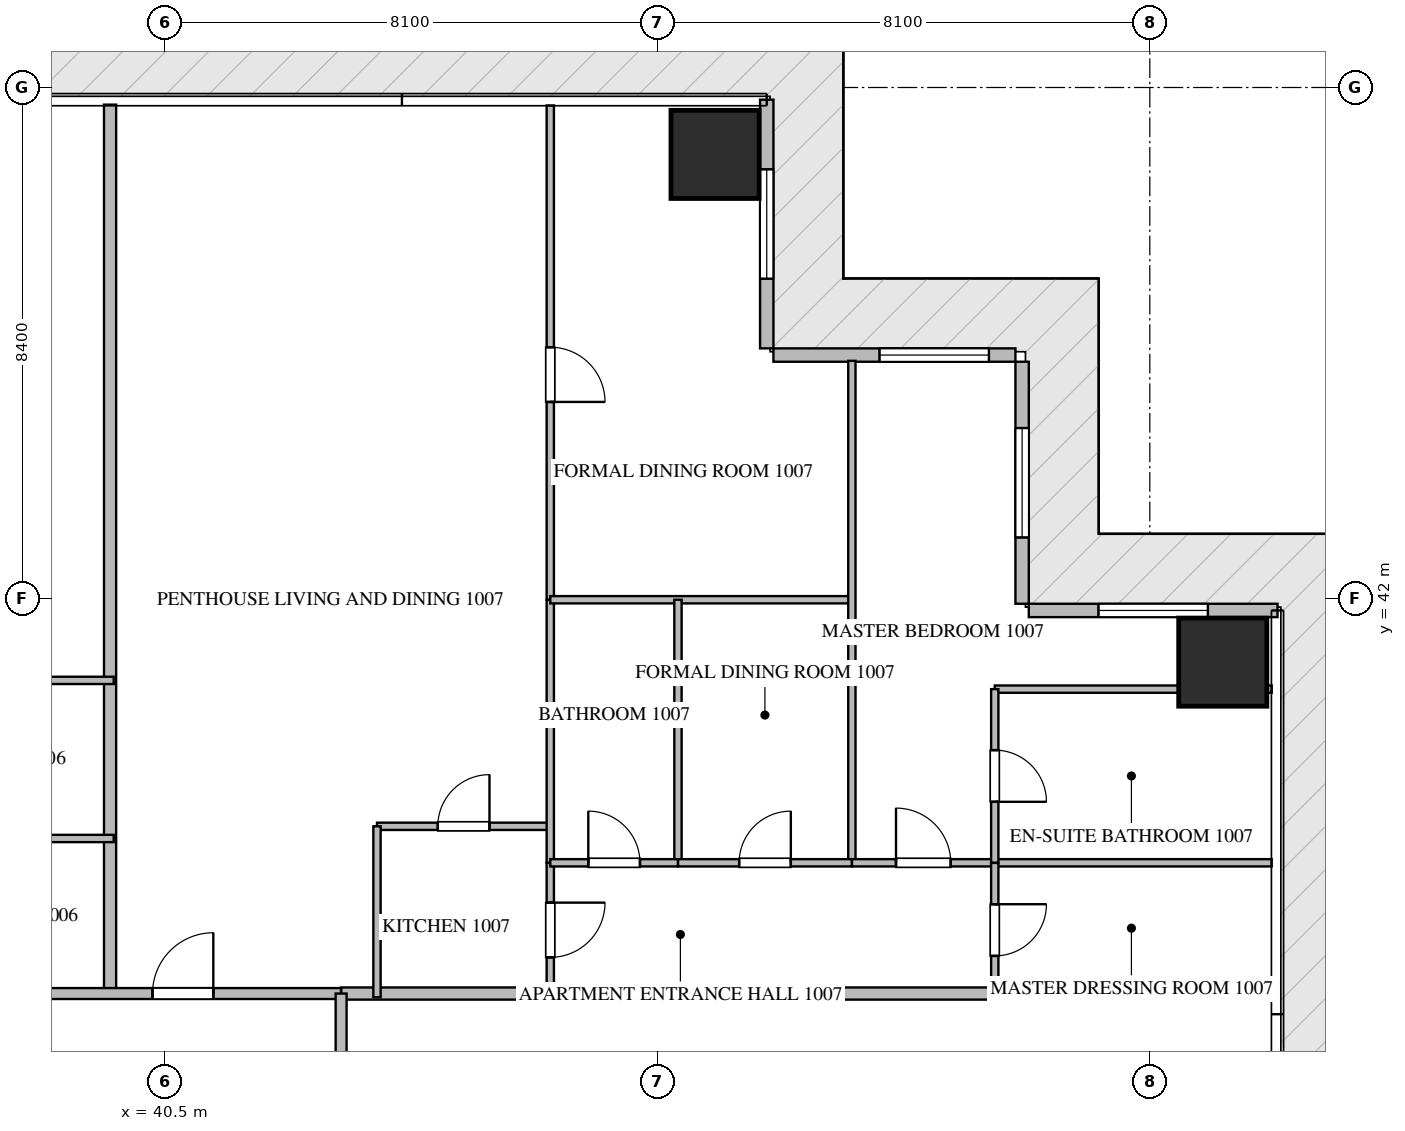
"""IFC4 building model, lengths in metres.
Left out: names, types, materials, properties, quantities, classifications, styles, units other than length and angle.
Written with IfcOpenShell. Run it as: python <this file> out.ifc"""

import sys

from ifc_helpers import new_model, si_unit, direction, frame, frame_2d, origin, origin_2d, place, context, subcontext, project, spatial, rectangle, extrude, source, transform, mapped, element, fill, save


model = new_model("IFC4")
c1 = context("Model", 3, precision=1e-05, world=origin(), true_north=direction((0.0, 1.0)))
c2 = subcontext(c1, "Body", "Model", "MODEL_VIEW")
j1 = project(units=[si_unit("LENGTHUNIT", "METRE"), si_unit("PLANEANGLEUNIT", "RADIAN")], contexts=[c1])
p1 = place(None, origin())
s1 = spatial("IfcSite", under=j1, at=p1, CompositionType="ELEMENT")
p2 = place(p1, origin())
s2 = spatial("IfcBuilding", under=s1, at=p2, CompositionType="ELEMENT")
p3 = place(p2, frame((0.0, 0.0, 45.45)))
s3 = spatial("IfcBuildingStorey", under=s2, at=p3, CompositionType="ELEMENT", Elevation=45.45)
m1 = source(origin(), c2, "Body", "SweptSolid", [
    extrude(rectangle(XDim=1.45, YDim=1.45, at=origin_2d()), origin(), (0.0, 0.0, 1.0), 3.75),
])
for number, where, z_axis, x_axis in (
    (1, (49.55, 49.3, -0.26), (0.0, 0.0, 1.0), (1.0, 0.0, 0.0)),
    (2, (57.9, 40.95, -0.26), (0.0, 0.0, 1.0), (1.0, 0.0, 0.0)),
):
    element("IfcColumn", number, at=place(p3, frame(where, z_axis=z_axis, x_axis=x_axis)), inside=s3, PredefinedType="COLUMN", context=c2, shape_type="MappedRepresentation", body=[
        mapped(m1, transform((0.0, 0.0, 0.0), scale=1.0)),
    ])
p4 = place(p3, frame((58.8, 41.8, 0.0), z_axis=(0.0, 0.0, 1.0), x_axis=(-1.0, 0.0, 0.0)))
e3 = element("IfcWall", 3, at=p4, inside=s3, PredefinedType="ELEMENTEDWALL", context=c2, shape_type="SweptSolid", body=[
    extrude(rectangle(XDim=4.09, YDim=0.22, at=frame_2d((2.045, 0.0))), origin(), (0.0, 0.0, 1.0), 3.475),
])
p5 = place(p4, frame((1.145, 0.0, 0.65)))
e4 = element("IfcOpeningElement", 4, at=p5, cuts=e3, PredefinedType="OPENING", context=c2, shape_type="SweptSolid", body=[
    extrude(rectangle(XDim=1.8, YDim=2.1, at=frame_2d((0.9, 1.05))), frame((0.0, 0.12, 0.0), z_axis=(0.0, -1.0, 0.0), x_axis=(1.0, 0.0, 0.0)), (0.0, 0.0, 1.0), 0.24),
])
p6 = place(p3, frame((54.6, 41.91, 0.0), z_axis=(0.0, 0.0, 1.0), x_axis=(0.0, 1.0, 0.0)))
e5 = element("IfcWall", 5, at=p6, inside=s3, PredefinedType="ELEMENTEDWALL", context=c2, shape_type="SweptSolid", body=[
    extrude(rectangle(XDim=3.98, YDim=0.22, at=frame_2d((1.99, 0.0))), origin(), (0.0, 0.0, 1.0), 3.475),
])
p7 = place(p6, frame((1.09, 0.0, 0.65)))
e6 = element("IfcOpeningElement", 6, at=p7, cuts=e5, PredefinedType="OPENING", context=c2, shape_type="SweptSolid", body=[
    extrude(rectangle(XDim=1.8, YDim=2.1, at=frame_2d((0.9, 1.05))), frame((0.0, 0.12, 0.0), z_axis=(0.0, -1.0, 0.0), x_axis=(1.0, 0.0, 0.0)), (0.0, 0.0, 1.0), 0.24),
])
p8 = place(p3, frame((54.49, 46.0, 0.0), z_axis=(0.0, 0.0, 1.0), x_axis=(-1.0, 0.0, 0.0)))
e7 = element("IfcWall", 7, at=p8, inside=s3, PredefinedType="ELEMENTEDWALL", context=c2, shape_type="SweptSolid", body=[
    extrude(rectangle(XDim=3.98, YDim=0.22, at=frame_2d((1.99, 0.0))), origin(), (0.0, 0.0, 1.0), 3.475),
])
p9 = place(p8, frame((0.436, 0.0, 0.65)))
e8 = element("IfcOpeningElement", 8, at=p9, cuts=e7, PredefinedType="OPENING", context=c2, shape_type="SweptSolid", body=[
    extrude(rectangle(XDim=1.8, YDim=2.1, at=frame_2d((0.9, 1.05))), frame((0.0, 0.12, 0.0), z_axis=(0.0, -1.0, 0.0), x_axis=(1.0, 0.0, 0.0)), (0.0, 0.0, 1.0), 0.24),
])
p10 = place(p3, frame((50.4, 46.11, 0.0), z_axis=(0.0, 0.0, 1.0), x_axis=(0.0, 1.0, 0.0)))
e9 = element("IfcWall", 9, at=p10, inside=s3, PredefinedType="ELEMENTEDWALL", context=c2, shape_type="SweptSolid", body=[
    extrude(rectangle(XDim=4.09, YDim=0.22, at=frame_2d((2.045, 0.0))), origin(), (0.0, 0.0, 1.0), 3.475),
])
p11 = place(p10, frame((1.145, 0.0, 0.65)))
e10 = element("IfcOpeningElement", 10, at=p11, cuts=e9, PredefinedType="OPENING", context=c2, shape_type="SweptSolid", body=[
    extrude(rectangle(XDim=1.8, YDim=2.1, at=frame_2d((0.9, 1.05))), frame((0.0, 0.12, 0.0), z_axis=(0.0, -1.0, 0.0), x_axis=(1.0, 0.0, 0.0)), (0.0, 0.0, 1.0), 0.24),
])
p12 = place(p3, frame((39.6, 35.5, 0.0), z_axis=(0.0, 0.0, 1.0), x_axis=(0.0, 1.0, 0.0)))
e11 = element("IfcWall", 11, at=p12, inside=s3, PredefinedType="PARTITIONING", context=c2, shape_type="SweptSolid", body=[
    extrude(rectangle(XDim=14.618, YDim=0.2, at=frame_2d((7.309, 0.0))), origin(), (0.0, 0.0, 1.0), 3.49),
])
p13 = place(p3, frame((43.4, 35.5, 0.0), z_axis=(0.0, 0.0, 1.0), x_axis=(1.0, 0.0, 0.0)))
e12 = element("IfcWall", 12, at=p13, inside=s3, PredefinedType="PARTITIONING", context=c2, shape_type="SweptSolid", body=[
    extrude(rectangle(XDim=15.318, YDim=0.2, at=frame_2d((7.659, 0.0))), origin(), (0.0, 0.0, 1.0), 3.49),
])
p14 = place(p3, frame((21.402, 35.5, 0.0), z_axis=(0.0, 0.0, 1.0), x_axis=(1.0, 0.0, 0.0)))
e13 = element("IfcWall", 13, at=p14, inside=s3, PredefinedType="PARTITIONING", context=c2, shape_type="SweptSolid", body=[
    extrude(rectangle(XDim=21.996, YDim=0.18, at=frame_2d((10.998, 0.0))), origin(), (0.0, 0.0, 1.0), 3.49),
])
p15 = place(p14, frame((2.1, 0.0, 0.0)))
e14 = element("IfcOpeningElement", 14, at=p15, cuts=e13, PredefinedType="OPENING", context=c2, shape_type="SweptSolid", body=[
    extrude(rectangle(XDim=1.0, YDim=2.15, at=frame_2d((0.5, 1.075))), frame((0.0, 0.1, 0.0), z_axis=(0.0, -1.0, 0.0), x_axis=(1.0, 0.0, 0.0)), (0.0, 0.0, 1.0), 0.2),
])
p16 = place(p14, frame((5.333, 0.0, 0.0)))
e15 = element("IfcOpeningElement", 15, at=p16, cuts=e13, PredefinedType="OPENING", context=c2, shape_type="SweptSolid", body=[
    extrude(rectangle(XDim=1.0, YDim=2.15, at=frame_2d((0.5, 1.075))), frame((0.0, 0.1, 0.0), z_axis=(0.0, -1.0, 0.0), x_axis=(1.0, 0.0, 0.0)), (0.0, 0.0, 1.0), 0.2),
])
p17 = place(p14, frame((11.842, 0.0, 0.0)))
e16 = element("IfcOpeningElement", 16, at=p17, cuts=e13, PredefinedType="OPENING", context=c2, shape_type="SweptSolid", body=[
    extrude(rectangle(XDim=1.0, YDim=2.15, at=frame_2d((0.5, 1.075))), frame((0.0, 0.1, 0.0), z_axis=(0.0, -1.0, 0.0), x_axis=(1.0, 0.0, 0.0)), (0.0, 0.0, 1.0), 0.2),
])
p18 = place(p14, frame((18.896, 0.0, 0.0)))
e17 = element("IfcOpeningElement", 17, at=p18, cuts=e13, PredefinedType="OPENING", context=c2, shape_type="SweptSolid", body=[
    extrude(rectangle(XDim=1.0, YDim=2.15, at=frame_2d((0.5, 1.075))), frame((0.0, 0.1, 0.0), z_axis=(0.0, -1.0, 0.0), x_axis=(1.0, 0.0, 0.0)), (0.0, 0.0, 1.0), 0.2),
])
p19 = place(p3, frame((43.4, 14.9, 0.0), z_axis=(0.0, 0.0, 1.0), x_axis=(0.0, 1.0, 0.0)))
e18 = element("IfcWall", 18, at=p19, inside=s3, PredefinedType="PARTITIONING", context=c2, shape_type="SweptSolid", body=[
    extrude(rectangle(XDim=20.6, YDim=0.18, at=frame_2d((10.3, 0.0))), origin(), (0.0, 0.0, 1.0), 3.49),
])
p20 = place(p19, frame((17.64, 0.0, 0.0)))
e19 = element("IfcOpeningElement", 19, at=p20, cuts=e18, PredefinedType="OPENING", context=c2, shape_type="SweptSolid", body=[
    extrude(rectangle(XDim=1.0, YDim=2.15, at=frame_2d((0.5, 1.075))), frame((0.0, 0.1, 0.0), z_axis=(0.0, -1.0, 0.0), x_axis=(1.0, 0.0, 0.0)), (0.0, 0.0, 1.0), 0.2),
])
for number, where, z_axis, x_axis in (
    (20, (35.3, 38.05, 0.0), (0.0, 0.0, 1.0), (1.0, 0.0, 0.0)),
    (21, (35.3, 40.65, 0.0), (0.0, 0.0, 1.0), (1.0, 0.0, 0.0)),
):
    element("IfcWall", number, at=place(p3, frame(where, z_axis=z_axis, x_axis=x_axis)), inside=s3, PredefinedType="PARTITIONING", context=c2, shape_type="SweptSolid", body=[
        extrude(rectangle(XDim=4.36, YDim=0.12, at=frame_2d((2.18, 0.0))), origin(), (0.0, 0.0, 1.0), 3.49),
    ])
p21 = place(p3, frame((43.99, 38.25, 0.0), z_axis=(0.0, 0.0, 1.0), x_axis=(1.0, 0.0, 0.0)))
e22 = element("IfcWall", 22, at=p21, inside=s3, PredefinedType="PARTITIONING", context=c2, shape_type="SweptSolid", body=[
    extrude(rectangle(XDim=2.85, YDim=0.12, at=frame_2d((1.425, 0.0))), origin(), (0.0, 0.0, 1.0), 3.49),
])
p22 = place(p21, frame((1.0, 0.0, 0.0)))
e23 = element("IfcOpeningElement", 23, at=p22, cuts=e22, PredefinedType="OPENING", context=c2, shape_type="SweptSolid", body=[
    extrude(rectangle(XDim=0.85, YDim=2.1, at=frame_2d((0.425, 1.05))), frame((0.0, 0.07, 0.0), z_axis=(0.0, -1.0, 0.0), x_axis=(1.0, 0.0, 0.0)), (0.0, 0.0, 1.0), 0.14),
])
p23 = place(p3, frame((43.99, 38.25, 0.0), z_axis=(0.0, 0.0, 1.0), x_axis=(0.0, -1.0, 0.0)))
e24 = element("IfcWall", 24, at=p23, inside=s3, PredefinedType="PARTITIONING", context=c2, shape_type="SweptSolid", body=[
    extrude(rectangle(XDim=2.81, YDim=0.12, at=frame_2d((1.405, 0.0))), origin(), (0.0, 0.0, 1.0), 3.49),
])
p24 = place(p3, frame((46.84, 37.65, 0.0), z_axis=(0.0, 0.0, 1.0), x_axis=(0.0, -1.0, 0.0)))
e25 = element("IfcWall", 25, at=p24, inside=s3, PredefinedType="PARTITIONING", context=c2, shape_type="SweptSolid", body=[
    extrude(rectangle(XDim=2.21, YDim=0.12, at=frame_2d((1.105, 0.0))), origin(), (0.0, 0.0, 1.0), 3.49),
])
p25 = place(p24, frame((0.655, 0.0, 0.0)))
e26 = element("IfcOpeningElement", 26, at=p25, cuts=e25, PredefinedType="OPENING", context=c2, shape_type="SweptSolid", body=[
    extrude(rectangle(XDim=0.9, YDim=2.1, at=frame_2d((0.45, 1.05))), frame((0.0, 0.07, 0.0), z_axis=(0.0, -1.0, 0.0), x_axis=(1.0, 0.0, 0.0)), (0.0, 0.0, 1.0), 0.14),
])
p26 = place(p3, frame((46.84, 50.105, 0.0), z_axis=(0.0, 0.0, 1.0), x_axis=(0.0, -1.0, 0.0)))
e27 = element("IfcWall", 27, at=p26, inside=s3, PredefinedType="PARTITIONING", context=c2, shape_type="SweptSolid", body=[
    extrude(rectangle(XDim=8.129, YDim=0.12, at=frame_2d((4.064, 0.0))), origin(), (0.0, 0.0, 1.0), 3.49),
])
p27 = place(p26, frame((3.976, 0.0, 0.0)))
e28 = element("IfcOpeningElement", 28, at=p27, cuts=e27, PredefinedType="OPENING", context=c2, shape_type="SweptSolid", body=[
    extrude(rectangle(XDim=0.9, YDim=2.1, at=frame_2d((0.45, 1.05))), frame((0.0, 0.07, 0.0), z_axis=(0.0, -1.0, 0.0), x_axis=(1.0, 0.0, 0.0)), (0.0, 0.0, 1.0), 0.14),
])
p28 = place(p3, frame((46.84, 41.974, 0.0), z_axis=(0.0, 0.0, 1.0), x_axis=(0.0, -1.0, 0.0)))
e29 = element("IfcWall", 29, at=p28, inside=s3, PredefinedType="PARTITIONING", context=c2, shape_type="SweptSolid", body=[
    extrude(rectangle(XDim=4.322, YDim=0.12, at=frame_2d((2.161, 0.0))), origin(), (0.0, 0.0, 1.0), 3.49),
])
p29 = place(p3, frame((46.84, 41.976, 0.0), z_axis=(0.0, 0.0, 1.0), x_axis=(1.0, 0.0, 0.0)))
e30 = element("IfcWall", 30, at=p29, inside=s3, PredefinedType="PARTITIONING", context=c2, shape_type="SweptSolid", body=[
    extrude(rectangle(XDim=4.96, YDim=0.12, at=frame_2d((2.48, 0.0))), origin(), (0.0, 0.0, 1.0), 3.49),
])
p30 = place(p3, frame((51.8, 45.905, 0.0), z_axis=(0.0, 0.0, 1.0), x_axis=(0.0, -1.0, 0.0)))
e31 = element("IfcWall", 31, at=p30, inside=s3, PredefinedType="PARTITIONING", context=c2, shape_type="SweptSolid", body=[
    extrude(rectangle(XDim=8.255, YDim=0.12, at=frame_2d((4.127, 0.0))), origin(), (0.0, 0.0, 1.0), 3.49),
])
p31 = place(p3, frame((48.94, 41.976, 0.0), z_axis=(0.0, 0.0, 1.0), x_axis=(0.0, -1.0, 0.0)))
e32 = element("IfcWall", 32, at=p31, inside=s3, PredefinedType="PARTITIONING", context=c2, shape_type="SweptSolid", body=[
    extrude(rectangle(XDim=4.326, YDim=0.12, at=frame_2d((2.163, 0.0))), origin(), (0.0, 0.0, 1.0), 3.49),
])
p32 = place(p3, frame((46.84, 37.65, 0.0), z_axis=(0.0, 0.0, 1.0), x_axis=(1.0, 0.0, 0.0)))
e33 = element("IfcWall", 33, at=p32, inside=s3, PredefinedType="PARTITIONING", context=c2, shape_type="SweptSolid", body=[
    extrude(rectangle(XDim=2.1, YDim=0.12, at=frame_2d((1.05, 0.0))), origin(), (0.0, 0.0, 1.0), 3.49),
])
p33 = place(p32, frame((0.625, 0.0, 0.0)))
e34 = element("IfcOpeningElement", 34, at=p33, cuts=e33, PredefinedType="OPENING", context=c2, shape_type="SweptSolid", body=[
    extrude(rectangle(XDim=0.85, YDim=2.1, at=frame_2d((0.425, 1.05))), frame((0.0, 0.07, 0.0), z_axis=(0.0, -1.0, 0.0), x_axis=(1.0, 0.0, 0.0)), (0.0, 0.0, 1.0), 0.14),
])
p34 = place(p3, frame((48.942, 37.65, 0.0), z_axis=(0.0, 0.0, 1.0), x_axis=(1.0, 0.0, 0.0)))
e35 = element("IfcWall", 35, at=p34, inside=s3, PredefinedType="PARTITIONING", context=c2, shape_type="SweptSolid", body=[
    extrude(rectangle(XDim=2.858, YDim=0.12, at=frame_2d((1.429, 0.0))), origin(), (0.0, 0.0, 1.0), 3.49),
])
p35 = place(p34, frame((1.004, 0.0, 0.0)))
e36 = element("IfcOpeningElement", 36, at=p35, cuts=e35, PredefinedType="OPENING", context=c2, shape_type="SweptSolid", body=[
    extrude(rectangle(XDim=0.85, YDim=2.1, at=frame_2d((0.425, 1.05))), frame((0.0, 0.07, 0.0), z_axis=(0.0, -1.0, 0.0), x_axis=(1.0, 0.0, 0.0)), (0.0, 0.0, 1.0), 0.14),
])
p36 = place(p3, frame((51.802, 37.65, 0.0), z_axis=(0.0, 0.0, 1.0), x_axis=(1.0, 0.0, 0.0)))
e37 = element("IfcWall", 37, at=p36, inside=s3, PredefinedType="PARTITIONING", context=c2, shape_type="SweptSolid", body=[
    extrude(rectangle(XDim=2.348, YDim=0.12, at=frame_2d((1.174, 0.0))), origin(), (0.0, 0.0, 1.0), 3.49),
])
p37 = place(p36, frame((0.724, 0.0, 0.0)))
e38 = element("IfcOpeningElement", 38, at=p37, cuts=e37, PredefinedType="OPENING", context=c2, shape_type="SweptSolid", body=[
    extrude(rectangle(XDim=0.9, YDim=2.1, at=frame_2d((0.45, 1.05))), frame((0.0, 0.07, 0.0), z_axis=(0.0, -1.0, 0.0), x_axis=(1.0, 0.0, 0.0)), (0.0, 0.0, 1.0), 0.14),
])
p38 = place(p3, frame((54.15, 40.506, 0.0), z_axis=(0.0, 0.0, 1.0), x_axis=(1.0, 0.0, 0.0)))
e39 = element("IfcWall", 39, at=p38, inside=s3, PredefinedType="PARTITIONING", context=c2, shape_type="SweptSolid", body=[
    extrude(rectangle(XDim=4.555, YDim=0.12, at=frame_2d((2.278, 0.0))), origin(), (0.0, 0.0, 1.0), 3.49),
])
p39 = place(p3, frame((54.152, 37.65, 0.0), z_axis=(0.0, 0.0, 1.0), x_axis=(1.0, 0.0, 0.0)))
e40 = element("IfcWall", 40, at=p39, inside=s3, PredefinedType="PARTITIONING", context=c2, shape_type="SweptSolid", body=[
    extrude(rectangle(XDim=4.553, YDim=0.12, at=frame_2d((2.276, 0.0))), origin(), (0.0, 0.0, 1.0), 3.49),
])
p40 = place(p3, frame((54.15, 40.506, 0.0), z_axis=(0.0, 0.0, 1.0), x_axis=(0.0, -1.0, 0.0)))
e41 = element("IfcWall", 41, at=p40, inside=s3, PredefinedType="PARTITIONING", context=c2, shape_type="SweptSolid", body=[
    extrude(rectangle(XDim=2.856, YDim=0.12, at=frame_2d((1.428, 0.0))), origin(), (0.0, 0.0, 1.0), 3.49),
])
p41 = place(p40, frame((1.003, 0.0, 0.0)))
e42 = element("IfcOpeningElement", 42, at=p41, cuts=e41, PredefinedType="OPENING", context=c2, shape_type="SweptSolid", body=[
    extrude(rectangle(XDim=0.85, YDim=2.1, at=frame_2d((0.425, 1.05))), frame((0.0, 0.07, 0.0), z_axis=(0.0, -1.0, 0.0), x_axis=(1.0, 0.0, 0.0)), (0.0, 0.0, 1.0), 0.14),
])
p42 = place(p3, frame((54.15, 37.648, 0.0), z_axis=(0.0, 0.0, 1.0), x_axis=(0.0, -1.0, 0.0)))
e43 = element("IfcWall", 43, at=p42, inside=s3, PredefinedType="PARTITIONING", context=c2, shape_type="SweptSolid", body=[
    extrude(rectangle(XDim=2.208, YDim=0.12, at=frame_2d((1.104, 0.0))), origin(), (0.0, 0.0, 1.0), 3.49),
])
p43 = place(p42, frame((0.679, 0.0, 0.0)))
e44 = element("IfcOpeningElement", 44, at=p43, cuts=e43, PredefinedType="OPENING", context=c2, shape_type="SweptSolid", body=[
    extrude(rectangle(XDim=0.85, YDim=2.1, at=frame_2d((0.425, 1.05))), frame((0.0, 0.07, 0.0), z_axis=(0.0, -1.0, 0.0), x_axis=(1.0, 0.0, 0.0)), (0.0, 0.0, 1.0), 0.14),
])
m2 = source(origin(), c2, "Body", "SweptSolid", [
    extrude(rectangle(XDim=1.8, YDim=2.1, at=frame_2d((0.9, 1.05))), frame((0.0, 0.03, 0.0), z_axis=(0.0, -1.0, 0.0), x_axis=(1.0, 0.0, 0.0)), (0.0, 0.0, 1.0), 0.06),
])
p44 = place(p5, origin())
e45 = element("IfcWindow", 45, at=p44, inside=s3, PartitioningType="SINGLE_PANEL", PredefinedType="WINDOW", context=c2, shape_type="MappedRepresentation", body=[
    mapped(m2, transform((0.0, 0.0, 0.0), scale=1.0)),
])
fill(e4, e45)
p45 = place(p7, origin())
e46 = element("IfcWindow", 46, at=p45, inside=s3, PartitioningType="SINGLE_PANEL", PredefinedType="WINDOW", context=c2, shape_type="MappedRepresentation", body=[
    mapped(m2, transform((0.0, 0.0, 0.0), scale=1.0)),
])
fill(e6, e46)
p46 = place(p9, origin())
e47 = element("IfcWindow", 47, at=p46, inside=s3, PartitioningType="SINGLE_PANEL", PredefinedType="WINDOW", context=c2, shape_type="MappedRepresentation", body=[
    mapped(m2, transform((0.0, 0.0, 0.0), scale=1.0)),
])
fill(e8, e47)
p47 = place(p11, origin())
e48 = element("IfcWindow", 48, at=p47, inside=s3, PartitioningType="SINGLE_PANEL", PredefinedType="WINDOW", context=c2, shape_type="MappedRepresentation", body=[
    mapped(m2, transform((0.0, 0.0, 0.0), scale=1.0)),
])
fill(e10, e48)
m3 = source(origin(), c2, "Body", "SweptSolid", [
    extrude(rectangle(XDim=1.0, YDim=2.15, at=frame_2d((0.5, 1.075))), frame((0.0, 0.025, 0.0), z_axis=(0.0, -1.0, 0.0), x_axis=(1.0, 0.0, 0.0)), (0.0, 0.0, 1.0), 0.05),
])
p48 = place(p18, origin())
e49 = element("IfcDoor", 49, at=p48, inside=s3, OperationType="SINGLE_SWING_RIGHT", PredefinedType="DOOR", context=c2, shape_type="MappedRepresentation", body=[
    mapped(m3, transform((0.0, 0.0, 0.0), scale=1.0)),
])
fill(e17, e49)
m4 = source(origin(), c2, "Body", "SweptSolid", [
    extrude(rectangle(XDim=0.85, YDim=2.1, at=frame_2d((0.425, 1.05))), frame((0.0, 0.025, 0.0), z_axis=(0.0, -1.0, 0.0), x_axis=(1.0, 0.0, 0.0)), (0.0, 0.0, 1.0), 0.05),
])
p49 = place(p22, origin())
e50 = element("IfcDoor", 50, at=p49, inside=s3, OperationType="SINGLE_SWING_RIGHT", PredefinedType="DOOR", context=c2, shape_type="MappedRepresentation", body=[
    mapped(m4, transform((0.0, 0.0, 0.0), scale=1.0)),
])
fill(e23, e50)
m5 = source(origin(), c2, "Body", "SweptSolid", [
    extrude(rectangle(XDim=0.9, YDim=2.1, at=frame_2d((0.45, 1.05))), frame((0.0, 0.025, 0.0), z_axis=(0.0, -1.0, 0.0), x_axis=(1.0, 0.0, 0.0)), (0.0, 0.0, 1.0), 0.05),
])
p50 = place(p25, origin())
e51 = element("IfcDoor", 51, at=p50, inside=s3, OperationType="SINGLE_SWING_LEFT", PredefinedType="DOOR", context=c2, shape_type="MappedRepresentation", body=[
    mapped(m5, transform((0.0, 0.0, 0.0), scale=1.0)),
])
fill(e26, e51)
p51 = place(p27, origin())
e52 = element("IfcDoor", 52, at=p51, inside=s3, OperationType="SINGLE_SWING_RIGHT", PredefinedType="DOOR", context=c2, shape_type="MappedRepresentation", body=[
    mapped(m5, transform((0.0, 0.0, 0.0), scale=1.0)),
])
fill(e28, e52)
p52 = place(p33, origin())
e53 = element("IfcDoor", 53, at=p52, inside=s3, OperationType="SINGLE_SWING_LEFT", PredefinedType="DOOR", context=c2, shape_type="MappedRepresentation", body=[
    mapped(m4, transform((0.0, 0.0, 0.0), scale=1.0)),
])
fill(e34, e53)
p53 = place(p35, origin())
e54 = element("IfcDoor", 54, at=p53, inside=s3, OperationType="SINGLE_SWING_RIGHT", PredefinedType="DOOR", context=c2, shape_type="MappedRepresentation", body=[
    mapped(m4, transform((0.0, 0.0, 0.0), scale=1.0)),
])
fill(e36, e54)
p54 = place(p37, origin())
e55 = element("IfcDoor", 55, at=p54, inside=s3, OperationType="SINGLE_SWING_LEFT", PredefinedType="DOOR", context=c2, shape_type="MappedRepresentation", body=[
    mapped(m5, transform((0.0, 0.0, 0.0), scale=1.0)),
])
fill(e38, e55)
p55 = place(p41, origin())
e56 = element("IfcDoor", 56, at=p55, inside=s3, OperationType="SINGLE_SWING_RIGHT", PredefinedType="DOOR", context=c2, shape_type="MappedRepresentation", body=[
    mapped(m4, transform((0.0, 0.0, 0.0), scale=1.0)),
])
fill(e42, e56)
p56 = place(p43, origin())
e57 = element("IfcDoor", 57, at=p56, inside=s3, OperationType="SINGLE_SWING_LEFT", PredefinedType="DOOR", context=c2, shape_type="MappedRepresentation", body=[
    mapped(m4, transform((0.0, 0.0, 0.0), scale=1.0)),
])
fill(e44, e57)
save(model, sys.argv[1])
